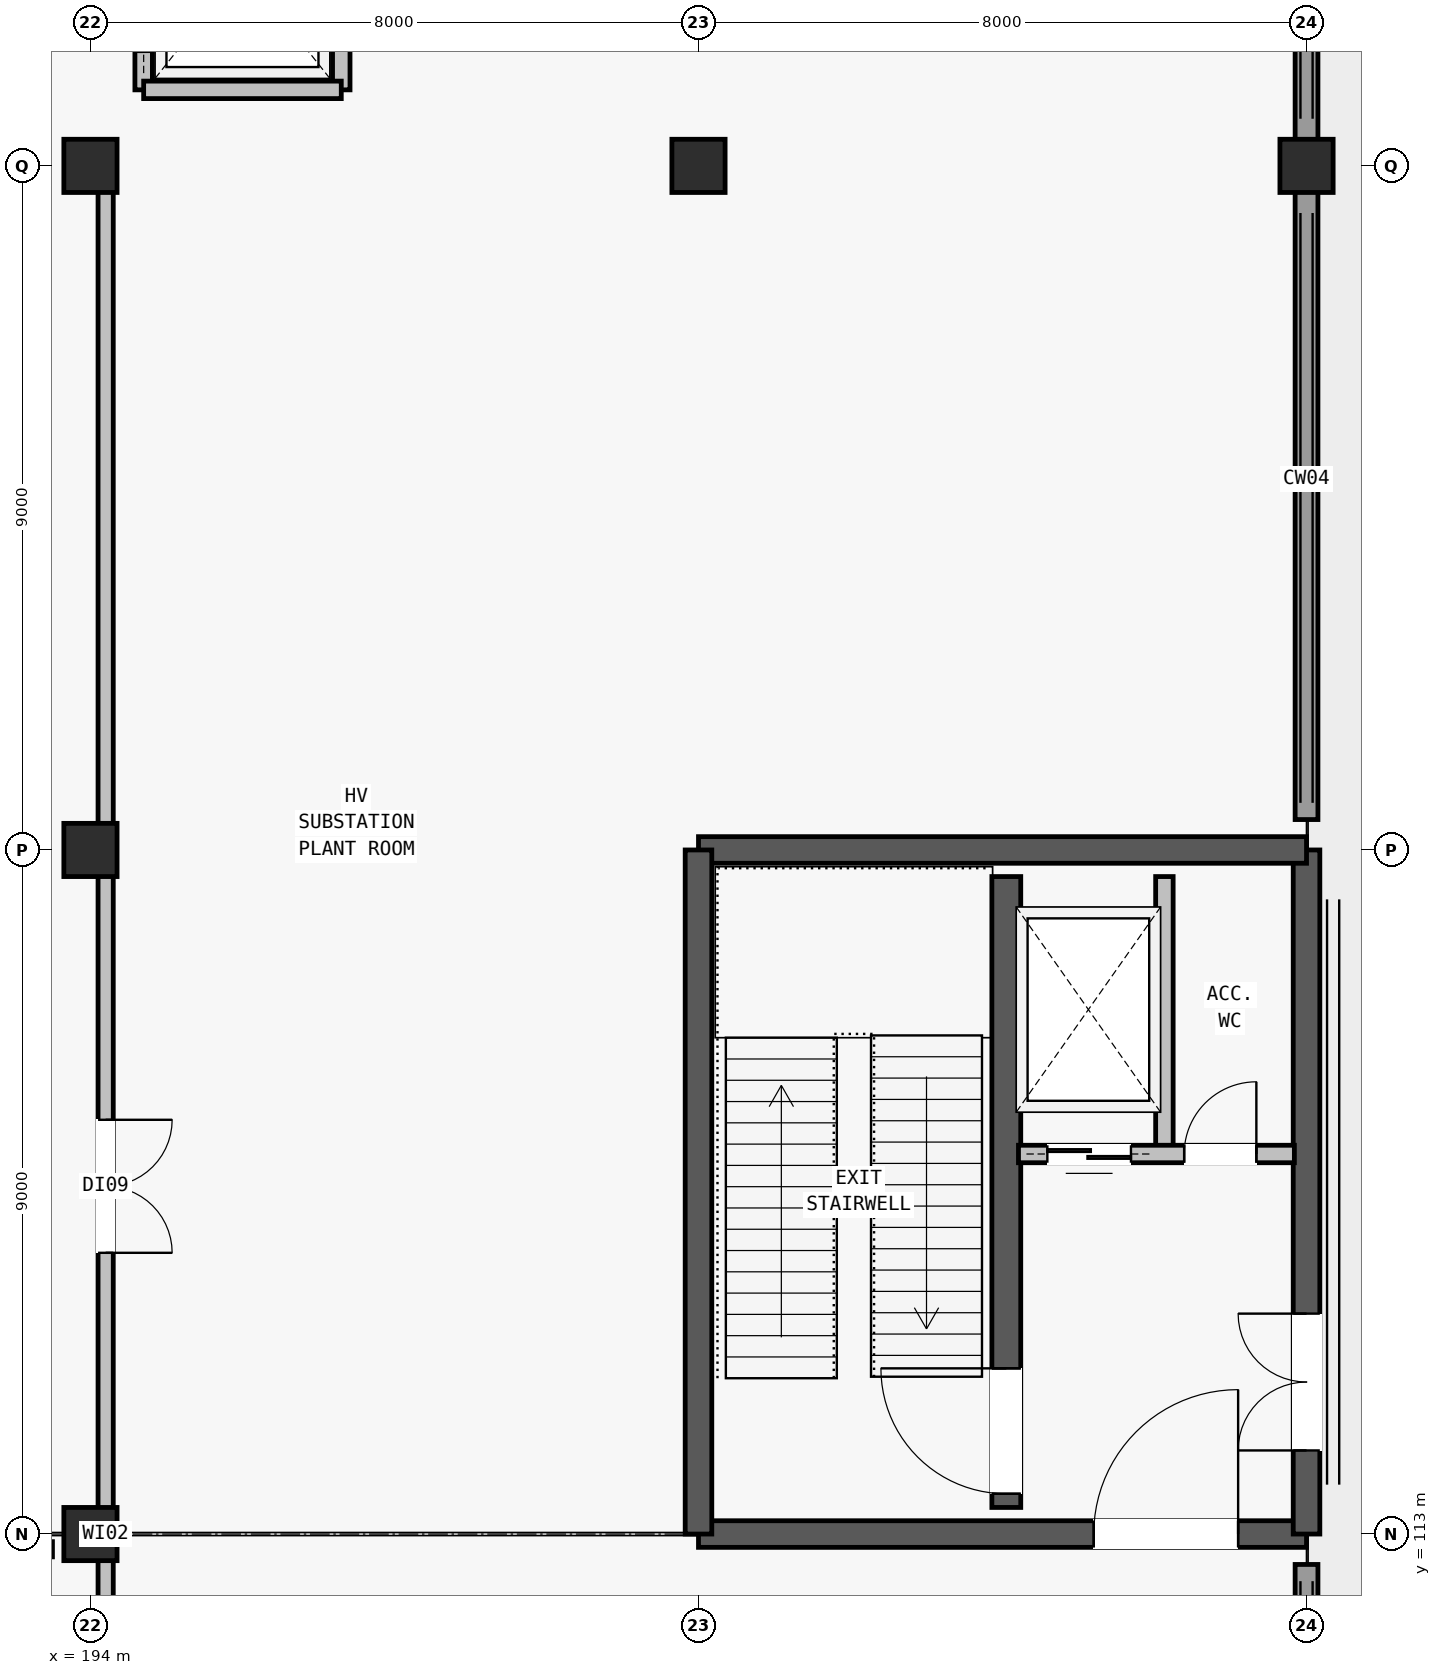
"""IFC4 building model, lengths in metres.
Left out: names, types, materials, properties, quantities, classifications, styles, units other than length and angle.
Written with IfcOpenShell. Run it as: python <this file> out.ifc"""

import sys

from ifc_helpers import new_model, si_unit, direction, frame, frame_2d, origin, origin_2d, place, context, subcontext, project, spatial, rectangle, extrude, element, fill, save


model = new_model("IFC4")
c1 = context("Model", 3, precision=1e-05, world=origin(), true_north=direction((0.0, 1.0)))
c2 = subcontext(c1, "Body", "Model", "MODEL_VIEW")
j1 = project(units=[si_unit("LENGTHUNIT", "METRE"), si_unit("PLANEANGLEUNIT", "RADIAN")], contexts=[c1])
p1 = place(None, origin())
s1 = spatial("IfcSite", under=j1, at=p1, CompositionType="ELEMENT")
p2 = place(p1, origin())
s2 = spatial("IfcBuilding", under=s1, at=p2, CompositionType="ELEMENT")
p3 = place(p2, origin())
s3 = spatial("IfcBuildingStorey", under=s2, at=p3, CompositionType="ELEMENT", Elevation=0.0)
for number, where, z_axis, x_axis in (
    (1, (194.0, 113.0, -0.9), (0.0, 0.0, 1.0), (1.0, 0.0, 0.0)),
    (2, (194.0, 122.0, -0.9), (0.0, 0.0, 1.0), (1.0, 0.0, 0.0)),
    (3, (194.0, 131.0, -0.9), (0.0, 0.0, 1.0), (1.0, 0.0, 0.0)),
    (4, (202.0, 131.0, -0.9), (0.0, 0.0, 1.0), (1.0, 0.0, 0.0)),
    (5, (210.0, 131.0, -0.9), (0.0, 0.0, 1.0), (1.0, 0.0, 0.0)),
):
    element("IfcColumn", number, at=place(p3, frame(where, z_axis=z_axis, x_axis=x_axis)), inside=s3, PredefinedType="COLUMN", context=c2, shape_type="SweptSolid", body=[
        extrude(rectangle(XDim=0.7, YDim=0.7, at=origin_2d()), origin(), (0.0, 0.0, 1.0), 6.5),
    ])
p4 = place(p3, frame((210.0, 72.4, -0.9), z_axis=(0.0, 0.0, 1.0), x_axis=(0.0, 1.0, 0.0)))
e6 = element("IfcWall", 6, at=p4, inside=s3, PredefinedType="STANDARD", context=c2, shape_type="SweptSolid", body=[
    extrude(rectangle(XDim=40.2, YDim=0.3, at=frame_2d((20.1, 0.0))), origin(), (0.0, 0.0, 1.0), 0.9),
])
p5 = place(p3, frame((210.0, 122.4, -0.9), z_axis=(0.0, 0.0, 1.0), x_axis=(0.0, 1.0, 0.0)))
e7 = element("IfcWall", 7, at=p5, inside=s3, PredefinedType="STANDARD", context=c2, shape_type="SweptSolid", body=[
    extrude(rectangle(XDim=25.6, YDim=0.3, at=frame_2d((12.8, 0.0))), origin(), (0.0, 0.0, 1.0), 0.9),
])
p6 = place(p3, frame((202.0, 113.0, -0.9), z_axis=(0.0, 0.0, 1.0), x_axis=(1.0, 0.0, 0.0)))
e8 = element("IfcWall", 8, at=p6, inside=s3, PredefinedType="SHEAR", context=c2, shape_type="SweptSolid", body=[
    extrude(rectangle(XDim=8.0, YDim=0.35, at=frame_2d((4.0, 0.0))), origin(), (0.0, 0.0, 1.0), 6.22),
])
p7 = place(p6, frame((5.2, 0.0, 0.9)))
e9 = element("IfcOpeningElement", 9, at=p7, cuts=e8, PredefinedType="OPENING", context=c2, shape_type="SweptSolid", body=[
    extrude(rectangle(XDim=1.9, YDim=2.3, at=frame_2d((0.95, 1.15))), frame((0.0, 0.185, 0.0), z_axis=(0.0, -1.0, 0.0), x_axis=(1.0, 0.0, 0.0)), (0.0, 0.0, 1.0), 0.37),
])
p8 = place(p3, frame((210.0, 113.0, -0.9), z_axis=(0.0, 0.0, 1.0), x_axis=(0.0, 1.0, 0.0)))
e10 = element("IfcWall", 10, at=p8, inside=s3, PredefinedType="SHEAR", context=c2, shape_type="SweptSolid", body=[
    extrude(rectangle(XDim=9.0, YDim=0.35, at=frame_2d((4.5, 0.0))), origin(), (0.0, 0.0, 1.0), 6.22),
])
p9 = place(p8, frame((1.1, 0.0, 0.9)))
e11 = element("IfcOpeningElement", 11, at=p9, cuts=e10, PredefinedType="OPENING", context=c2, shape_type="SweptSolid", body=[
    extrude(rectangle(XDim=1.8, YDim=2.25, at=frame_2d((0.9, 1.125))), frame((0.0, 0.185, 0.0), z_axis=(0.0, -1.0, 0.0), x_axis=(1.0, 0.0, 0.0)), (0.0, 0.0, 1.0), 0.37),
])
p10 = place(p3, frame((210.0, 122.0, -0.9), z_axis=(0.0, 0.0, 1.0), x_axis=(-1.0, 0.0, 0.0)))
e12 = element("IfcWall", 12, at=p10, inside=s3, PredefinedType="SHEAR", context=c2, shape_type="SweptSolid", body=[
    extrude(rectangle(XDim=8.0, YDim=0.35, at=frame_2d((4.0, 0.0))), origin(), (0.0, 0.0, 1.0), 6.22),
])
p11 = place(p3, frame((202.0, 122.0, -0.9), z_axis=(0.0, 0.0, 1.0), x_axis=(0.0, -1.0, 0.0)))
e13 = element("IfcWall", 13, at=p11, inside=s3, PredefinedType="SHEAR", context=c2, shape_type="SweptSolid", body=[
    extrude(rectangle(XDim=9.0, YDim=0.35, at=frame_2d((4.5, 0.0))), origin(), (0.0, 0.0, 1.0), 6.22),
])
p12 = place(p3, frame((206.05, 113.35, -0.9), z_axis=(0.0, 0.0, 1.0), x_axis=(0.0, 1.0, 0.0)))
e14 = element("IfcWall", 14, at=p12, inside=s3, PredefinedType="SHEAR", context=c2, shape_type="SweptSolid", body=[
    extrude(rectangle(XDim=8.3, YDim=0.38, at=frame_2d((4.15, 0.0))), origin(), (0.0, 0.0, 1.0), 6.22),
])
p13 = place(p12, frame((0.18, 0.0, 0.9)))
e15 = element("IfcOpeningElement", 15, at=p13, cuts=e14, PredefinedType="OPENING", context=c2, shape_type="SweptSolid", body=[
    extrude(rectangle(XDim=1.65, YDim=2.2, at=frame_2d((0.825, 1.1))), frame((0.0, 0.2, 0.0), z_axis=(0.0, -1.0, 0.0), x_axis=(1.0, 0.0, 0.0)), (0.0, 0.0, 1.0), 0.4),
])
p14 = place(p3, frame((208.13, 118.0, 0.0), z_axis=(0.0, 0.0, 1.0), x_axis=(0.0, 1.0, 0.0)))
e16 = element("IfcWall", 16, at=p14, inside=s3, PredefinedType="PARTITIONING", context=c2, shape_type="SweptSolid", body=[
    extrude(rectangle(XDim=3.65, YDim=0.23, at=frame_2d((1.825, 0.0))), origin(), (0.0, 0.0, 1.0), 4.2),
])
p15 = place(p3, frame((206.21, 118.0, 0.0), z_axis=(0.0, 0.0, 1.0), x_axis=(1.0, 0.0, 0.0)))
e17 = element("IfcWall", 17, at=p15, inside=s3, PredefinedType="PARTITIONING", context=c2, shape_type="SweptSolid", body=[
    extrude(rectangle(XDim=3.63, YDim=0.23, at=frame_2d((1.815, 0.0))), origin(), (0.0, 0.0, 1.0), 4.2),
])
p16 = place(p15, frame((0.38, 0.0, 0.0)))
e18 = element("IfcOpeningElement", 18, at=p16, cuts=e17, PredefinedType="OPENING", context=c2, shape_type="SweptSolid", body=[
    extrude(rectangle(XDim=1.1, YDim=2.15, at=frame_2d((0.55, 1.075))), frame((0.0, 0.125, 0.0), z_axis=(0.0, -1.0, 0.0), x_axis=(1.0, 0.0, 0.0)), (0.0, 0.0, 1.0), 0.25),
])
p17 = place(p15, frame((2.18, 0.0, 0.0)))
e19 = element("IfcOpeningElement", 19, at=p17, cuts=e17, PredefinedType="OPENING", context=c2, shape_type="SweptSolid", body=[
    extrude(rectangle(XDim=0.95, YDim=2.1, at=frame_2d((0.475, 1.05))), frame((0.0, 0.125, 0.0), z_axis=(0.0, -1.0, 0.0), x_axis=(1.0, 0.0, 0.0)), (0.0, 0.0, 1.0), 0.25),
])
p18 = place(p3, frame((194.7, 132.0, 0.0), z_axis=(0.0, 0.0, 1.0), x_axis=(0.0, 1.0, 0.0)))
e20 = element("IfcWall", 20, at=p18, inside=s3, PredefinedType="PARTITIONING", context=c2, shape_type="SweptSolid", body=[
    extrude(rectangle(XDim=3.2, YDim=0.23, at=frame_2d((1.6, 0.0))), origin(), (0.0, 0.0, 1.0), 4.2),
])
p19 = place(p18, frame((0.5, 0.0, 0.0)))
e21 = element("IfcOpeningElement", 21, at=p19, cuts=e20, PredefinedType="OPENING", context=c2, shape_type="SweptSolid", body=[
    extrude(rectangle(XDim=1.4, YDim=2.3, at=frame_2d((0.7, 1.15))), frame((0.0, 0.125, 0.0), z_axis=(0.0, -1.0, 0.0), x_axis=(1.0, 0.0, 0.0)), (0.0, 0.0, 1.0), 0.25),
])
p20 = place(p3, frame((197.3, 135.2, 0.0), z_axis=(0.0, 0.0, 1.0), x_axis=(0.0, -1.0, 0.0)))
e22 = element("IfcWall", 22, at=p20, inside=s3, PredefinedType="PARTITIONING", context=c2, shape_type="SweptSolid", body=[
    extrude(rectangle(XDim=3.2, YDim=0.23, at=frame_2d((1.6, 0.0))), origin(), (0.0, 0.0, 1.0), 4.2),
])
p21 = place(p3, frame((197.3, 132.0, 0.0), z_axis=(0.0, 0.0, 1.0), x_axis=(-1.0, 0.0, 0.0)))
e23 = element("IfcWall", 23, at=p21, inside=s3, PredefinedType="PARTITIONING", context=c2, shape_type="SweptSolid", body=[
    extrude(rectangle(XDim=2.6, YDim=0.23, at=frame_2d((1.3, 0.0))), origin(), (0.0, 0.0, 1.0), 4.2),
])
p22 = place(p3, frame((194.2, 86.2, 0.0), z_axis=(0.0, 0.0, 1.0), x_axis=(0.0, 1.0, 0.0)))
e24 = element("IfcWall", 24, at=p22, inside=s3, PredefinedType="PARTITIONING", context=c2, shape_type="SweptSolid", body=[
    extrude(rectangle(XDim=45.0, YDim=0.2, at=frame_2d((22.5, 0.0))), origin(), (0.0, 0.0, 1.0), 4.2),
])
p23 = place(p22, frame((13.5, 0.0, 0.0)))
e25 = element("IfcOpeningElement", 25, at=p23, cuts=e24, PredefinedType="OPENING", context=c2, shape_type="SweptSolid", body=[
    extrude(rectangle(XDim=2.1, YDim=2.35, at=frame_2d((1.05, 1.175))), frame((0.0, 0.11, 0.0), z_axis=(0.0, -1.0, 0.0), x_axis=(1.0, 0.0, 0.0)), (0.0, 0.0, 1.0), 0.22),
])
p24 = place(p22, frame((30.5, 0.0, 0.0)))
e26 = element("IfcOpeningElement", 26, at=p24, cuts=e24, PredefinedType="OPENING", context=c2, shape_type="SweptSolid", body=[
    extrude(rectangle(XDim=1.75, YDim=2.25, at=frame_2d((0.875, 1.125))), frame((0.0, 0.11, 0.0), z_axis=(0.0, -1.0, 0.0), x_axis=(1.0, 0.0, 0.0)), (0.0, 0.0, 1.0), 0.22),
])
p25 = place(p7, origin())
e27 = element("IfcDoor", 27, at=p25, inside=s3, OperationType="SINGLE_SWING_RIGHT", PredefinedType="DOOR", context=c2, shape_type="SweptSolid", body=[
    extrude(rectangle(XDim=1.9, YDim=2.3, at=frame_2d((0.95, 1.15))), frame((0.0, 0.025, 0.0), z_axis=(0.0, -1.0, 0.0), x_axis=(1.0, 0.0, 0.0)), (0.0, 0.0, 1.0), 0.05),
])
fill(e9, e27)
p26 = place(p9, origin())
e28 = element("IfcDoor", 28, at=p26, inside=s3, OperationType="DOUBLE_SWING_LEFT", PredefinedType="DOOR", context=c2, shape_type="SweptSolid", body=[
    extrude(rectangle(XDim=1.8, YDim=2.25, at=frame_2d((0.9, 1.125))), frame((0.0, 0.025, 0.0), z_axis=(0.0, -1.0, 0.0), x_axis=(1.0, 0.0, 0.0)), (0.0, 0.0, 1.0), 0.05),
])
fill(e11, e28)
p27 = place(p13, origin())
e29 = element("IfcDoor", 29, at=p27, inside=s3, OperationType="SINGLE_SWING_RIGHT", PredefinedType="DOOR", context=c2, shape_type="SweptSolid", body=[
    extrude(rectangle(XDim=1.65, YDim=2.2, at=frame_2d((0.825, 1.1))), frame((0.0, 0.025, 0.0), z_axis=(0.0, -1.0, 0.0), x_axis=(1.0, 0.0, 0.0)), (0.0, 0.0, 1.0), 0.05),
])
fill(e15, e29)
p28 = place(p16, origin())
e30 = element("IfcDoor", 30, at=p28, inside=s3, OperationType="SLIDING_TO_LEFT", PredefinedType="DOOR", context=c2, shape_type="SweptSolid", body=[
    extrude(rectangle(XDim=1.1, YDim=2.15, at=frame_2d((0.55, 1.075))), frame((0.0, 0.025, 0.0), z_axis=(0.0, -1.0, 0.0), x_axis=(1.0, 0.0, 0.0)), (0.0, 0.0, 1.0), 0.05),
])
fill(e18, e30)
p29 = place(p17, origin())
e31 = element("IfcDoor", 31, at=p29, inside=s3, OperationType="SINGLE_SWING_RIGHT", PredefinedType="DOOR", context=c2, shape_type="SweptSolid", body=[
    extrude(rectangle(XDim=0.95, YDim=2.1, at=frame_2d((0.475, 1.05))), frame((0.0, 0.025, 0.0), z_axis=(0.0, -1.0, 0.0), x_axis=(1.0, 0.0, 0.0)), (0.0, 0.0, 1.0), 0.05),
])
fill(e19, e31)
p30 = place(p24, origin())
e32 = element("IfcDoor", 32, at=p30, inside=s3, OperationType="DOUBLE_SWING_RIGHT", PredefinedType="DOOR", context=c2, shape_type="SweptSolid", body=[
    extrude(rectangle(XDim=1.75, YDim=2.25, at=frame_2d((0.875, 1.125))), frame((0.0, 0.025, 0.0), z_axis=(0.0, -1.0, 0.0), x_axis=(1.0, 0.0, 0.0)), (0.0, 0.0, 1.0), 0.05),
])
fill(e26, e32)
save(model, sys.argv[1])
